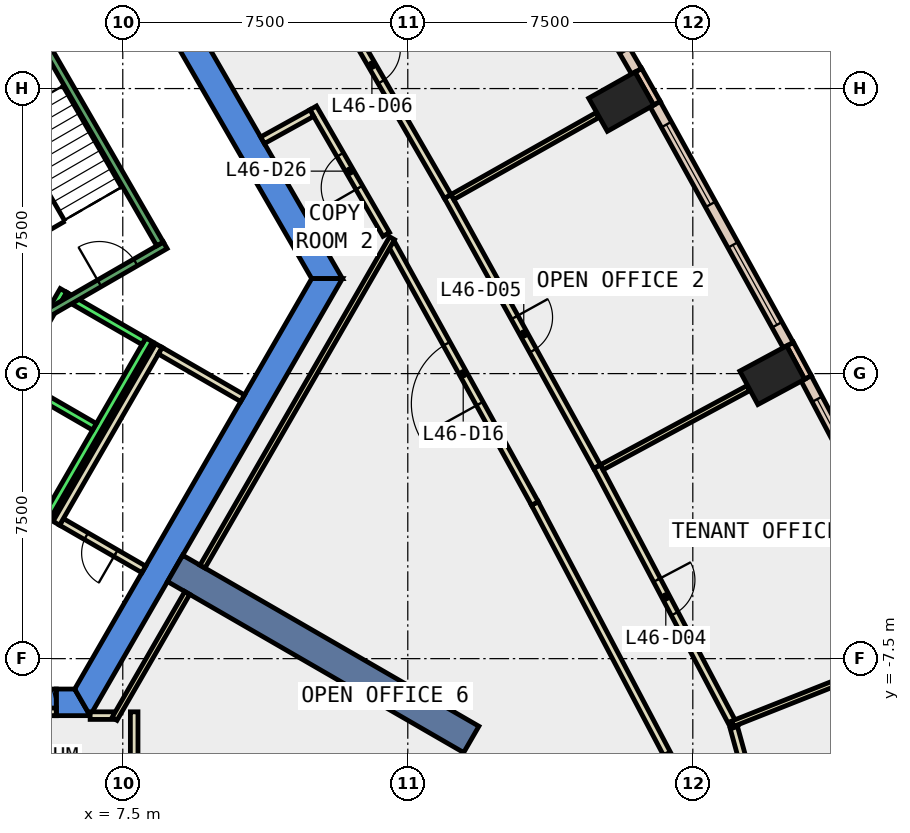
"""IFC4 building model, lengths in metres.
Left out: names, types, materials, properties, quantities, classifications, styles, units other than length and angle.
Written with IfcOpenShell. Run it as: python <this file> out.ifc"""

import sys

from ifc_helpers import new_model, si_unit, direction, frame, frame_2d, origin, origin_2d, place, context, subcontext, project, spatial, polyline, rectangle, outline, extrude, element, fill, save


model = new_model("IFC4")
c1 = context("Model", 3, precision=1e-05, world=origin(), true_north=direction((0.0, 1.0)))
c2 = subcontext(c1, "Body", "Model", "MODEL_VIEW")
j1 = project(units=[si_unit("LENGTHUNIT", "METRE"), si_unit("PLANEANGLEUNIT", "RADIAN")], contexts=[c1])
p1 = place(None, origin())
s1 = spatial("IfcSite", under=j1, at=p1, CompositionType="ELEMENT")
p2 = place(p1, origin())
s2 = spatial("IfcBuilding", under=s1, at=p2, CompositionType="ELEMENT")
p3 = place(p2, frame((0.0, 0.0, 206.6)))
s3 = spatial("IfcBuildingStorey", under=s2, at=p3, CompositionType="ELEMENT", Elevation=206.6)
for number, where, z_axis, x_axis in (
    (1, (24.591, -0.042, -0.4), (0.0, 0.0, 1.0), (-0.474, 0.88, 0.0)),
    (2, (20.615, 7.155, -0.4), (0.0, 0.0, 1.0), (-0.491, 0.871, 0.0)),
):
    element("IfcColumn", number, at=place(p3, frame(where, z_axis=z_axis, x_axis=x_axis)), inside=s3, PredefinedType="COLUMN", context=c2, shape_type="SweptSolid", body=[
        extrude(rectangle(XDim=1.0, YDim=1.4, at=origin_2d()), origin(), (0.0, 0.0, 1.0), 4.2),
    ])
p4 = place(p3, frame((0.0, 0.0, -0.4)))
e3 = element("IfcWall", 3, at=p4, inside=s3, PredefinedType="SHEAR", context=c2, shape_type="SweptSolid", body=[
    extrude(outline(polyline([(8.084, 11.498), (7.478, 11.148), (12.471, 2.5), (13.279, 2.5), (8.084, 11.498)])), origin(), (0.0, 0.0, 1.0), 4.2),
])
p5 = place(p3, frame((0.0, 0.0, -0.4)))
e4 = element("IfcWall", 4, at=p5, inside=s3, PredefinedType="SHEAR", context=c2, shape_type="SweptSolid", body=[
    extrude(outline(polyline([(5.75, -8.3), (5.75, -9.0), (6.64, -9.0), (6.235, -8.3), (5.75, -8.3)])), origin(), (0.0, 0.0, 1.0), 4.2),
])
p6 = place(p3, frame((0.0, 0.0, 3.6)))
e5 = element("IfcWall", 5, at=p6, inside=s3, PredefinedType="SHEAR", context=c2, shape_type="SweptSolid", body=[
    extrude(outline(polyline([(5.75, -9.0), (5.75, -8.3), (3.75, -8.3), (3.75, -9.0), (5.75, -9.0)])), origin(), (0.0, 0.0, 1.0), 0.2),
])
p7 = place(p3, frame((0.0, 0.0, -0.4)))
e6 = element("IfcWall", 6, at=p7, inside=s3, PredefinedType="SHEAR", context=c2, shape_type="SweptSolid", body=[
    extrude(outline(polyline([(6.64, -9.0), (13.279, 2.5), (12.471, 2.5), (6.235, -8.3), (6.64, -9.0)])), origin(), (0.0, 0.0, 1.0), 4.2),
])
p8 = place(p3, frame((8.877, -5.125, -0.4), z_axis=(0.0, 0.0, 1.0), x_axis=(0.866017533419, -0.500013631625, 0.0)))
e7 = element("IfcWall", 7, at=p8, inside=s3, PredefinedType="SHEAR", context=c2, shape_type="SweptSolid", body=[
    extrude(rectangle(XDim=9.0, YDim=0.8, at=frame_2d((4.5, 0.0))), origin(), (0.0, 0.0, 1.0), 4.2),
])
p9 = place(p3, frame((25.532, -0.103, 0.0), z_axis=(0.0, 0.0, 1.0), x_axis=(-0.473663196434, 0.88070606694, 0.0)))
e8 = element("IfcWall", 8, at=p9, inside=s3, PredefinedType="STANDARD", context=c2, shape_type="SweptSolid", body=[
    extrude(rectangle(XDim=1.0, YDim=0.2, at=frame_2d((0.5, 0.0))), origin(), (0.0, 0.0, 1.0), 3.8),
])
p10 = place(p3, frame((21.558, 7.112, 0.0), z_axis=(0.0, 0.0, 1.0), x_axis=(-0.492033129803, 0.870576475202, 0.0)))
e9 = element("IfcWall", 9, at=p10, inside=s3, PredefinedType="STANDARD", context=c2, shape_type="SweptSolid", body=[
    extrude(rectangle(XDim=1.0, YDim=0.2, at=frame_2d((0.5, 0.0))), origin(), (0.0, 0.0, 1.0), 3.8),
])
p11 = place(p3, frame((28.879, -6.559, 0.0), z_axis=(0.0, 0.0, 1.0), x_axis=(-0.466789249342, 0.884368586449, 0.0)))
e10 = element("IfcWall", 10, at=p11, inside=s3, PredefinedType="STANDARD", context=c2, shape_type="SweptSolid", body=[
    extrude(rectangle(XDim=7.273, YDim=0.3, at=frame_2d((3.637, 0.0))), origin(), (0.0, 0.0, 1.0), 3.8),
])
p12 = place(p11, frame((0.618, 0.0, 0.9)))
e11 = element("IfcOpeningElement", 11, at=p12, cuts=e10, PredefinedType="OPENING", context=c2, shape_type="SweptSolid", body=[
    extrude(rectangle(XDim=2.4, YDim=2.6, at=frame_2d((1.2, 1.3))), frame((0.0, 0.16, 0.0), z_axis=(0.0, -1.0, 0.0), x_axis=(1.0, 0.0, 0.0)), (0.0, 0.0, 1.0), 0.32),
])
p13 = place(p11, frame((4.255, 0.0, 0.9)))
e12 = element("IfcOpeningElement", 12, at=p13, cuts=e10, PredefinedType="OPENING", context=c2, shape_type="SweptSolid", body=[
    extrude(rectangle(XDim=2.4, YDim=2.6, at=frame_2d((1.2, 1.3))), frame((0.0, 0.16, 0.0), z_axis=(0.0, -1.0, 0.0), x_axis=(1.0, 0.0, 0.0)), (0.0, 0.0, 1.0), 0.32),
])
p14 = place(p3, frame((25.01, 0.751, 0.0), z_axis=(0.0, 0.0, 1.0), x_axis=(-0.483590905878, 0.875294142419, 0.0)))
e13 = element("IfcWall", 13, at=p14, inside=s3, PredefinedType="STANDARD", context=c2, shape_type="SweptSolid", body=[
    extrude(rectangle(XDim=7.238, YDim=0.3, at=frame_2d((3.619, 0.0))), origin(), (0.0, 0.0, 1.0), 3.8),
])
p15 = place(p14, frame((0.609, 0.0, 0.9)))
e14 = element("IfcOpeningElement", 14, at=p15, cuts=e13, PredefinedType="OPENING", context=c2, shape_type="SweptSolid", body=[
    extrude(rectangle(XDim=2.4, YDim=2.6, at=frame_2d((1.2, 1.3))), frame((0.0, 0.16, 0.0), z_axis=(0.0, -1.0, 0.0), x_axis=(1.0, 0.0, 0.0)), (0.0, 0.0, 1.0), 0.32),
])
p16 = place(p14, frame((4.228, 0.0, 0.9)))
e15 = element("IfcOpeningElement", 15, at=p16, cuts=e13, PredefinedType="OPENING", context=c2, shape_type="SweptSolid", body=[
    extrude(rectangle(XDim=2.4, YDim=2.6, at=frame_2d((1.2, 1.3))), frame((0.0, 0.16, 0.0), z_axis=(0.0, -1.0, 0.0), x_axis=(1.0, 0.0, 0.0)), (0.0, 0.0, 1.0), 0.32),
])
p17 = place(p3, frame((21.019, 7.955, 0.0), z_axis=(0.0, 0.0, 1.0), x_axis=(-0.500012402131, 0.866018243292, 0.0)))
e16 = element("IfcWall", 16, at=p17, inside=s3, PredefinedType="STANDARD", context=c2, shape_type="SweptSolid", body=[
    extrude(rectangle(XDim=7.24, YDim=0.3, at=frame_2d((3.62, 0.0))), origin(), (0.0, 0.0, 1.0), 3.8),
])
p18 = place(p17, frame((0.61, 0.0, 0.9)))
e17 = element("IfcOpeningElement", 17, at=p18, cuts=e16, PredefinedType="OPENING", context=c2, shape_type="SweptSolid", body=[
    extrude(rectangle(XDim=2.4, YDim=2.6, at=frame_2d((1.2, 1.3))), frame((0.0, 0.16, 0.0), z_axis=(0.0, -1.0, 0.0), x_axis=(1.0, 0.0, 0.0)), (0.0, 0.0, 1.0), 0.32),
])
p19 = place(p17, frame((4.23, 0.0, 0.9)))
e18 = element("IfcOpeningElement", 18, at=p19, cuts=e16, PredefinedType="OPENING", context=c2, shape_type="SweptSolid", body=[
    extrude(rectangle(XDim=2.4, YDim=2.6, at=frame_2d((1.2, 1.3))), frame((0.0, 0.16, 0.0), z_axis=(0.0, -1.0, 0.0), x_axis=(1.0, 0.0, 0.0)), (0.0, 0.0, 1.0), 0.32),
])
p20 = place(p3, frame((14.433, 3.663, 0.0), z_axis=(0.0, 0.0, 1.0), x_axis=(-0.500149526678, 0.865939057303, 0.0)))
e19 = element("IfcWall", 19, at=p20, inside=s3, PredefinedType="PARTITIONING", context=c2, shape_type="SweptSolid", body=[
    extrude(rectangle(XDim=3.843, YDim=0.2, at=frame_2d((1.921, 0.0))), origin(), (0.0, 0.0, 1.0), 3.8),
])
p21 = place(p20, frame((1.422, 0.0, 0.0)))
e20 = element("IfcOpeningElement", 20, at=p21, cuts=e19, PredefinedType="OPENING", context=c2, shape_type="SweptSolid", body=[
    extrude(rectangle(XDim=1.0, YDim=2.1, at=frame_2d((0.5, 1.05))), frame((0.0, 0.11, 0.0), z_axis=(0.0, -1.0, 0.0), x_axis=(1.0, 0.0, 0.0)), (0.0, 0.0, 1.0), 0.22),
])
p22 = place(p3, frame((12.474, 6.856, 0.0), z_axis=(0.0, 0.0, 1.0), x_axis=(-0.875305814696, -0.483569778584, 0.0)))
e21 = element("IfcWall", 21, at=p22, inside=s3, PredefinedType="PARTITIONING", context=c2, shape_type="SweptSolid", body=[
    extrude(rectangle(XDim=1.481, YDim=0.2, at=frame_2d((0.74, 0.0))), origin(), (0.0, 0.0, 1.0), 3.8),
])
p23 = place(p3, frame((22.35, -12.006, 0.0), z_axis=(0.0, 0.0, 1.0), x_axis=(-0.265584627827, 0.964087550725, 0.0)))
e22 = element("IfcWall", 22, at=p23, inside=s3, PredefinedType="PARTITIONING", context=c2, shape_type="SweptSolid", body=[
    extrude(rectangle(XDim=2.067, YDim=0.2, at=frame_2d((1.034, 0.0))), origin(), (0.0, 0.0, 1.0), 3.8),
])
p24 = place(p3, frame((21.821, -10.005, 0.0), z_axis=(0.0, 0.0, 1.0), x_axis=(-0.466770012358, 0.884378739887, 0.0)))
e23 = element("IfcWall", 23, at=p24, inside=s3, PredefinedType="PARTITIONING", context=c2, shape_type="SweptSolid", body=[
    extrude(rectangle(XDim=7.449, YDim=0.2, at=frame_2d((3.725, 0.0))), origin(), (0.0, 0.0, 1.0), 3.8),
])
p25 = place(p3, frame((18.344, -3.417, 0.0), z_axis=(0.0, 0.0, 1.0), x_axis=(-0.483555501116, 0.875313702247, 0.0)))
e24 = element("IfcWall", 24, at=p25, inside=s3, PredefinedType="PARTITIONING", context=c2, shape_type="SweptSolid", body=[
    extrude(rectangle(XDim=7.801, YDim=0.2, at=frame_2d((3.9, 0.0))), origin(), (0.0, 0.0, 1.0), 3.8),
])
p26 = place(p25, frame((3.0, 0.0, 0.0)))
e25 = element("IfcOpeningElement", 25, at=p26, cuts=e24, PredefinedType="OPENING", context=c2, shape_type="SweptSolid", body=[
    extrude(rectangle(XDim=1.8, YDim=2.1, at=frame_2d((0.9, 1.05))), frame((0.0, 0.11, 0.0), z_axis=(0.0, -1.0, 0.0), x_axis=(1.0, 0.0, 0.0)), (0.0, 0.0, 1.0), 0.22),
])
p27 = place(p3, frame((23.578, -9.309, 0.0), z_axis=(0.0, 0.0, 1.0), x_axis=(0.265884037198, -0.964005020092, 0.0)))
e26 = element("IfcWall", 26, at=p27, inside=s3, PredefinedType="PARTITIONING", context=c2, shape_type="SweptSolid", body=[
    extrude(rectangle(XDim=2.784, YDim=0.2, at=frame_2d((1.392, 0.0))), origin(), (0.0, 0.0, 1.0), 3.8),
])
p28 = place(p3, frame((19.98, -2.448, 0.0), z_axis=(0.0, 0.0, 1.0), x_axis=(0.466864023915, -0.884329114738, 0.0)))
e27 = element("IfcWall", 27, at=p28, inside=s3, PredefinedType="PARTITIONING", context=c2, shape_type="SweptSolid", body=[
    extrude(rectangle(XDim=7.75, YDim=0.2, at=frame_2d((3.875, 0.0))), origin(), (0.0, 0.0, 1.0), 3.8),
])
p29 = place(p28, frame((3.375, 0.0, 0.0)))
e28 = element("IfcOpeningElement", 28, at=p29, cuts=e27, PredefinedType="OPENING", context=c2, shape_type="SweptSolid", body=[
    extrude(rectangle(XDim=1.0, YDim=2.1, at=frame_2d((0.5, 1.05))), frame((0.0, 0.11, 0.0), z_axis=(0.0, -1.0, 0.0), x_axis=(1.0, 0.0, 0.0)), (0.0, 0.0, 1.0), 0.22),
])
p30 = place(p3, frame((16.051, 4.663, 0.0), z_axis=(0.0, 0.0, 1.0), x_axis=(0.483513440344, -0.875336936846, 0.0)))
e29 = element("IfcWall", 29, at=p30, inside=s3, PredefinedType="PARTITIONING", context=c2, shape_type="SweptSolid", body=[
    extrude(rectangle(XDim=8.124, YDim=0.2, at=frame_2d((4.062, 0.0))), origin(), (0.0, 0.0, 1.0), 3.8),
])
p31 = place(p30, frame((3.637, 0.0, 0.0)))
e30 = element("IfcOpeningElement", 30, at=p31, cuts=e29, PredefinedType="OPENING", context=c2, shape_type="SweptSolid", body=[
    extrude(rectangle(XDim=1.0, YDim=2.1, at=frame_2d((0.5, 1.05))), frame((0.0, 0.11, 0.0), z_axis=(0.0, -1.0, 0.0), x_axis=(1.0, 0.0, 0.0)), (0.0, 0.0, 1.0), 0.22),
])
p32 = place(p3, frame((11.987, 11.698, 0.0), z_axis=(0.0, 0.0, 1.0), x_axis=(0.500075329254, -0.865981908051, 0.0)))
e31 = element("IfcWall", 31, at=p32, inside=s3, PredefinedType="PARTITIONING", context=c2, shape_type="SweptSolid", body=[
    extrude(rectangle(XDim=8.125, YDim=0.2, at=frame_2d((4.062, 0.0))), origin(), (0.0, 0.0, 1.0), 3.8),
])
p33 = place(p32, frame((3.637, 0.0, 0.0)))
e32 = element("IfcOpeningElement", 32, at=p33, cuts=e31, PredefinedType="OPENING", context=c2, shape_type="SweptSolid", body=[
    extrude(rectangle(XDim=1.0, YDim=2.1, at=frame_2d((0.5, 1.05))), frame((0.0, 0.11, 0.0), z_axis=(0.0, -1.0, 0.0), x_axis=(1.0, 0.0, 0.0)), (0.0, 0.0, 1.0), 0.22),
])
p34 = place(p3, frame((8.053, -5.152, 0.0), z_axis=(0.0, 0.0, 1.0), x_axis=(-0.866022959057, 0.500004234368, 0.0)))
e33 = element("IfcWall", 33, at=p34, inside=s3, PredefinedType="PARTITIONING", context=c2, shape_type="SweptSolid", body=[
    extrude(rectangle(XDim=2.5, YDim=0.2, at=frame_2d((1.25, 0.0))), origin(), (0.0, 0.0, 1.0), 3.8),
])
p35 = place(p34, frame((0.85, 0.0, 0.0)))
e34 = element("IfcOpeningElement", 34, at=p35, cuts=e33, PredefinedType="OPENING", context=c2, shape_type="SweptSolid", body=[
    extrude(rectangle(XDim=0.9, YDim=2.1, at=frame_2d((0.45, 1.05))), frame((0.0, 0.11, 0.0), z_axis=(0.0, -1.0, 0.0), x_axis=(1.0, 0.0, 0.0)), (0.0, 0.0, 1.0), 0.22),
])
p36 = place(p3, frame((5.751, -3.938, 0.0), z_axis=(0.0, 0.0, 1.0), x_axis=(0.500034260056, 0.866005622828, 0.0)))
e35 = element("IfcWall", 35, at=p36, inside=s3, PredefinedType="PARTITIONING", context=c2, shape_type="SweptSolid", body=[
    extrude(rectangle(XDim=5.399, YDim=0.2, at=frame_2d((2.7, 0.0))), origin(), (0.0, 0.0, 1.0), 3.8),
])
p37 = place(p3, frame((8.488, 0.602, 0.0), z_axis=(0.0, 0.0, 1.0), x_axis=(0.866022959057, -0.500004234368, 0.0)))
e36 = element("IfcWall", 36, at=p37, inside=s3, PredefinedType="PARTITIONING", context=c2, shape_type="SweptSolid", body=[
    extrude(rectangle(XDim=2.5, YDim=0.2, at=frame_2d((1.25, 0.0))), origin(), (0.0, 0.0, 1.0), 3.8),
])
p38 = place(p3, frame((6.641, -8.999, 0.0), z_axis=(0.0, 0.0, 1.0), x_axis=(1.0, 0.0, 0.0)))
e37 = element("IfcWall", 37, at=p38, inside=s3, PredefinedType="PARTITIONING", context=c2, shape_type="SweptSolid", body=[
    extrude(rectangle(XDim=0.617, YDim=0.2, at=frame_2d((0.309, 0.0))), origin(), (0.0, 0.0, 1.0), 3.8),
])
p39 = place(p3, frame((7.283, -9.086, 0.0), z_axis=(0.0, 0.0, 1.0), x_axis=(0.500035303972, 0.866005020067, 0.0)))
e38 = element("IfcWall", 38, at=p39, inside=s3, PredefinedType="PARTITIONING", context=c2, shape_type="SweptSolid", body=[
    extrude(rectangle(XDim=3.828, YDim=0.15, at=frame_2d((1.914, 0.0))), origin(), (0.0, 0.0, 1.0), 3.8),
])
p40 = place(p3, frame((7.8, -8.899, 0.0), z_axis=(0.0, 0.0, 1.0), x_axis=(0.0, -1.0, 0.0)))
e39 = element("IfcWall", 39, at=p40, inside=s3, PredefinedType="PARTITIONING", context=c2, shape_type="SweptSolid", body=[
    extrude(rectangle(XDim=5.542, YDim=0.2, at=frame_2d((2.771, 0.0))), origin(), (0.0, 0.0, 1.0), 3.8),
])
p41 = place(p3, frame((23.552, -9.212, 0.0), z_axis=(0.0, 0.0, 1.0), x_axis=(0.929720624715, 0.368265610639, 0.0)))
e40 = element("IfcWall", 40, at=p41, inside=s3, PredefinedType="PARTITIONING", context=c2, shape_type="SweptSolid", body=[
    extrude(rectangle(XDim=4.515, YDim=0.15, at=frame_2d((2.258, 0.0))), origin(), (0.0, 0.0, 1.0), 3.8),
])
p42 = place(p3, frame((20.103, -2.466, 0.0), z_axis=(0.0, 0.0, 1.0), x_axis=(0.879965969606, 0.475036727354, 0.0)))
e41 = element("IfcWall", 41, at=p42, inside=s3, PredefinedType="PARTITIONING", context=c2, shape_type="SweptSolid", body=[
    extrude(rectangle(XDim=4.381, YDim=0.15, at=frame_2d((2.19, 0.0))), origin(), (0.0, 0.0, 1.0), 3.8),
])
p43 = place(p3, frame((16.174, 4.646, 0.0), z_axis=(0.0, 0.0, 1.0), x_axis=(0.870725770229, 0.491768881752, 0.0)))
e42 = element("IfcWall", 42, at=p43, inside=s3, PredefinedType="PARTITIONING", context=c2, shape_type="SweptSolid", body=[
    extrude(rectangle(XDim=4.38, YDim=0.15, at=frame_2d((2.19, 0.0))), origin(), (0.0, 0.0, 1.0), 3.8),
])
p44 = place(p3, frame((3.75, -8.9, 0.0), z_axis=(0.0, 0.0, 1.0), x_axis=(1.0, 0.0, 0.0)))
e43 = element("IfcWall", 43, at=p44, inside=s3, PredefinedType="PARTITIONING", context=c2, shape_type="SweptSolid", body=[
    extrude(rectangle(XDim=2.0, YDim=0.2, at=frame_2d((1.0, 0.0))), origin(), (0.0, 0.0, 1.0), 2.4),
])
p45 = place(p44, frame((0.19, 0.0, 0.0)))
e44 = element("IfcOpeningElement", 44, at=p45, cuts=e43, PredefinedType="OPENING", context=c2, shape_type="SweptSolid", body=[
    extrude(rectangle(XDim=1.8, YDim=2.1, at=frame_2d((0.9, 1.05))), frame((0.0, 0.11, 0.0), z_axis=(0.0, -1.0, 0.0), x_axis=(1.0, 0.0, 0.0)), (0.0, 0.0, 1.0), 0.22),
])
p46 = place(p3, frame((9.597, -5.079, 0.0), z_axis=(0.0, 0.0, 1.0), x_axis=(0.499962477963, 0.866047066059, 0.0)))
e45 = element("IfcWall", 45, at=p46, inside=s3, PredefinedType="PARTITIONING", context=c2, shape_type="SweptSolid", body=[
    extrude(rectangle(XDim=9.979, YDim=0.15, at=frame_2d((4.989, 0.0))), origin(), (0.0, 0.0, 1.0), 3.8),
])
p47 = place(p3, frame((3.24, -2.488, 0.0), z_axis=(0.0, 0.0, 1.0), x_axis=(0.500034260056, 0.866005622828, 0.0)))
e46 = element("IfcWall", 46, at=p47, inside=s3, PredefinedType="STANDARD", context=c2, shape_type="SweptSolid", body=[
    extrude(rectangle(XDim=5.399, YDim=0.2, at=frame_2d((2.7, 0.0))), origin(), (0.0, 0.0, 1.0), 3.8),
])
p48 = place(p47, frame((3.225, 0.0, 0.0)))
e47 = element("IfcOpeningElement", 47, at=p48, cuts=e46, PredefinedType="OPENING", context=c2, shape_type="SweptSolid", body=[
    extrude(rectangle(XDim=1.1, YDim=2.1, at=frame_2d((0.55, 1.05))), frame((0.0, 0.11, 0.0), z_axis=(0.0, -1.0, 0.0), x_axis=(1.0, 0.0, 0.0)), (0.0, 0.0, 1.0), 0.22),
])
p49 = place(p47, frame((1.225, 0.0, 0.0)))
e48 = element("IfcOpeningElement", 48, at=p49, cuts=e46, PredefinedType="OPENING", context=c2, shape_type="SweptSolid", body=[
    extrude(rectangle(XDim=1.1, YDim=2.1, at=frame_2d((0.55, 1.05))), frame((0.0, 0.11, 0.0), z_axis=(0.0, -1.0, 0.0), x_axis=(1.0, 0.0, 0.0)), (0.0, 0.0, 1.0), 0.22),
])
p50 = place(p3, frame((5.492, -3.788, 0.0), z_axis=(0.0, 0.0, 1.0), x_axis=(0.500034260056, 0.866005622828, 0.0)))
e49 = element("IfcWall", 49, at=p50, inside=s3, PredefinedType="STANDARD", context=c2, shape_type="SweptSolid", body=[
    extrude(rectangle(XDim=5.399, YDim=0.2, at=frame_2d((2.7, 0.0))), origin(), (0.0, 0.0, 1.0), 3.8),
])
for number, where, z_axis, x_axis in (
    (50, (4.677, -0.2, 0.0), (0.0, 0.0, 1.0), (0.866, -0.5, 0.0)),
    (51, (5.977, 2.052, 0.0), (0.0, 0.0, 1.0), (0.866, -0.5, 0.0)),
):
    element("IfcWall", number, at=place(p3, frame(where, z_axis=z_axis, x_axis=x_axis)), inside=s3, PredefinedType="STANDARD", context=c2, shape_type="SweptSolid", body=[
        extrude(rectangle(XDim=2.399, YDim=0.2, at=frame_2d((1.2, 0.0))), origin(), (0.0, 0.0, 1.0), 3.8),
    ])
p51 = place(p3, frame((4.806, 1.176, 0.0), z_axis=(0.0, 0.0, 1.0), x_axis=(0.866059941101, 0.499940174841, 0.0)))
e52 = element("IfcWall", 52, at=p51, inside=s3, PredefinedType="STANDARD", context=c2, shape_type="SweptSolid", body=[
    extrude(rectangle(XDim=4.4, YDim=0.2, at=frame_2d((2.2, 0.0))), origin(), (0.0, 0.0, 1.0), 3.8),
])
p52 = place(p51, frame((2.4, 0.0, 0.0)))
e53 = element("IfcOpeningElement", 53, at=p52, cuts=e52, PredefinedType="OPENING", context=c2, shape_type="SweptSolid", body=[
    extrude(rectangle(XDim=1.1, YDim=2.2, at=frame_2d((0.55, 1.1))), frame((0.0, 0.11, 0.0), z_axis=(0.0, -1.0, 0.0), x_axis=(1.0, 0.0, 0.0)), (0.0, 0.0, 1.0), 0.22),
])
p53 = place(p3, frame((8.48, 3.412, 0.0), z_axis=(0.0, 0.0, 1.0), x_axis=(-0.499978703459, 0.866037698999, 0.0)))
e54 = element("IfcWall", 54, at=p53, inside=s3, PredefinedType="STANDARD", context=c2, shape_type="SweptSolid", body=[
    extrude(rectangle(XDim=6.9, YDim=0.2, at=frame_2d((3.45, 0.0))), origin(), (0.0, 0.0, 1.0), 3.8),
])
p54 = place(p13, origin())
e55 = element("IfcWindow", 55, at=p54, inside=s3, PartitioningType="SINGLE_PANEL", PredefinedType="WINDOW", context=c2, shape_type="SweptSolid", body=[
    extrude(rectangle(XDim=2.4, YDim=2.6, at=frame_2d((1.2, 1.3))), frame((0.0, 0.03, 0.0), z_axis=(0.0, -1.0, 0.0), x_axis=(1.0, 0.0, 0.0)), (0.0, 0.0, 1.0), 0.06),
])
fill(e12, e55)
p55 = place(p15, origin())
e56 = element("IfcWindow", 56, at=p55, inside=s3, PartitioningType="SINGLE_PANEL", PredefinedType="WINDOW", context=c2, shape_type="SweptSolid", body=[
    extrude(rectangle(XDim=2.4, YDim=2.6, at=frame_2d((1.2, 1.3))), frame((0.0, 0.03, 0.0), z_axis=(0.0, -1.0, 0.0), x_axis=(1.0, 0.0, 0.0)), (0.0, 0.0, 1.0), 0.06),
])
fill(e14, e56)
p56 = place(p16, origin())
e57 = element("IfcWindow", 57, at=p56, inside=s3, PartitioningType="SINGLE_PANEL", PredefinedType="WINDOW", context=c2, shape_type="SweptSolid", body=[
    extrude(rectangle(XDim=2.4, YDim=2.6, at=frame_2d((1.2, 1.3))), frame((0.0, 0.03, 0.0), z_axis=(0.0, -1.0, 0.0), x_axis=(1.0, 0.0, 0.0)), (0.0, 0.0, 1.0), 0.06),
])
fill(e15, e57)
p57 = place(p29, origin())
e58 = element("IfcDoor", 58, at=p57, inside=s3, OperationType="SINGLE_SWING_LEFT", PredefinedType="DOOR", context=c2, shape_type="SweptSolid", body=[
    extrude(rectangle(XDim=1.0, YDim=2.1, at=frame_2d((0.5, 1.05))), frame((0.0, 0.025, 0.0), z_axis=(0.0, -1.0, 0.0), x_axis=(1.0, 0.0, 0.0)), (0.0, 0.0, 1.0), 0.05),
])
fill(e28, e58)
p58 = place(p31, origin())
e59 = element("IfcDoor", 59, at=p58, inside=s3, OperationType="SINGLE_SWING_RIGHT", PredefinedType="DOOR", context=c2, shape_type="SweptSolid", body=[
    extrude(rectangle(XDim=1.0, YDim=2.1, at=frame_2d((0.5, 1.05))), frame((0.0, 0.025, 0.0), z_axis=(0.0, -1.0, 0.0), x_axis=(1.0, 0.0, 0.0)), (0.0, 0.0, 1.0), 0.05),
])
fill(e30, e59)
p59 = place(p33, origin())
e60 = element("IfcDoor", 60, at=p59, inside=s3, OperationType="SINGLE_SWING_RIGHT", PredefinedType="DOOR", context=c2, shape_type="SweptSolid", body=[
    extrude(rectangle(XDim=1.0, YDim=2.1, at=frame_2d((0.5, 1.05))), frame((0.0, 0.025, 0.0), z_axis=(0.0, -1.0, 0.0), x_axis=(1.0, 0.0, 0.0)), (0.0, 0.0, 1.0), 0.05),
])
fill(e32, e60)
p60 = place(p26, origin())
e61 = element("IfcDoor", 61, at=p60, inside=s3, OperationType="DOUBLE_DOOR_SINGLE_SWING", PredefinedType="DOOR", context=c2, shape_type="SweptSolid", body=[
    extrude(rectangle(XDim=1.8, YDim=2.1, at=frame_2d((0.9, 1.05))), frame((0.0, 0.025, 0.0), z_axis=(0.0, -1.0, 0.0), x_axis=(1.0, 0.0, 0.0)), (0.0, 0.0, 1.0), 0.05),
])
fill(e25, e61)
p61 = place(p21, origin())
e62 = element("IfcDoor", 62, at=p61, inside=s3, OperationType="SINGLE_SWING_RIGHT", PredefinedType="DOOR", context=c2, shape_type="SweptSolid", body=[
    extrude(rectangle(XDim=1.0, YDim=2.1, at=frame_2d((0.5, 1.05))), frame((0.0, 0.025, 0.0), z_axis=(0.0, -1.0, 0.0), x_axis=(1.0, 0.0, 0.0)), (0.0, 0.0, 1.0), 0.05),
])
fill(e20, e62)
p62 = place(p35, origin())
e63 = element("IfcDoor", 63, at=p62, inside=s3, OperationType="SINGLE_SWING_LEFT", PredefinedType="DOOR", context=c2, shape_type="SweptSolid", body=[
    extrude(rectangle(XDim=0.9, YDim=2.1, at=frame_2d((0.45, 1.05))), frame((0.0, 0.025, 0.0), z_axis=(0.0, -1.0, 0.0), x_axis=(1.0, 0.0, 0.0)), (0.0, 0.0, 1.0), 0.05),
])
fill(e34, e63)
p63 = place(p45, origin())
e64 = element("IfcDoor", 64, at=p63, inside=s3, OperationType="DOUBLE_DOOR_SINGLE_SWING", PredefinedType="DOOR", context=c2, shape_type="SweptSolid", body=[
    extrude(rectangle(XDim=1.8, YDim=2.1, at=frame_2d((0.9, 1.05))), frame((0.0, 0.025, 0.0), z_axis=(0.0, -1.0, 0.0), x_axis=(1.0, 0.0, 0.0)), (0.0, 0.0, 1.0), 0.05),
])
fill(e44, e64)
p64 = place(p52, origin())
e65 = element("IfcDoor", 65, at=p64, inside=s3, OperationType="SINGLE_SWING_LEFT", PredefinedType="DOOR", context=c2, shape_type="SweptSolid", body=[
    extrude(rectangle(XDim=1.1, YDim=2.2, at=frame_2d((0.55, 1.1))), frame((0.0, 0.025, 0.0), z_axis=(0.0, -1.0, 0.0), x_axis=(1.0, 0.0, 0.0)), (0.0, 0.0, 1.0), 0.05),
])
fill(e53, e65)
save(model, sys.argv[1])
